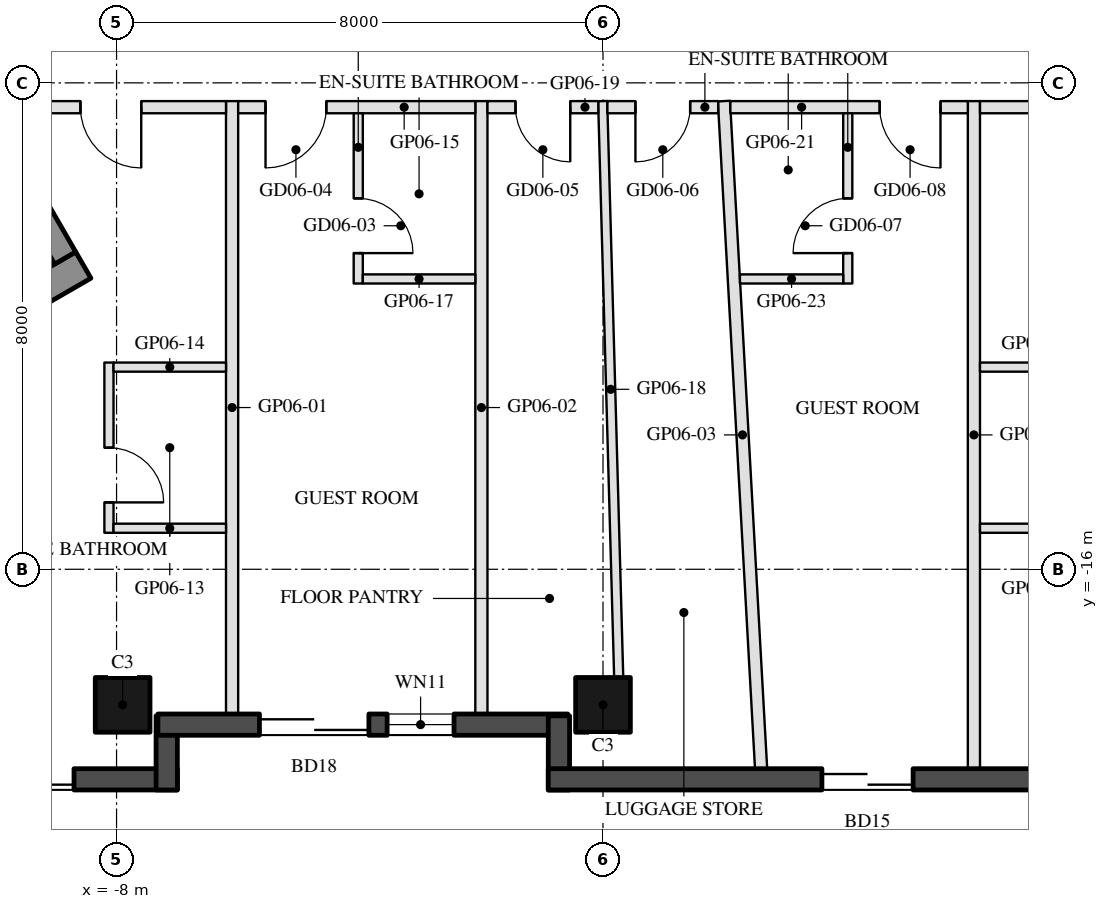
"""IFC4 building model, lengths in metres.
Left out: names, types, materials, properties, quantities, classifications, styles, units other than length and angle.
Written with IfcOpenShell. Run it as: python <this file> out.ifc"""

import sys

from ifc_helpers import new_model, si_unit, direction, frame, frame_2d, origin, origin_2d, place, context, subcontext, project, spatial, rectangle, hollow_rectangle, extrude, element, fill, save


model = new_model("IFC4")
c1 = context("Model", 3, precision=1e-05, world=origin(), true_north=direction((0.0, 1.0)))
c2 = subcontext(c1, "Body", "Model", "MODEL_VIEW")
j1 = project(units=[si_unit("LENGTHUNIT", "METRE"), si_unit("PLANEANGLEUNIT", "RADIAN")], contexts=[c1])
p1 = place(None, origin())
s1 = spatial("IfcSite", under=j1, at=p1, CompositionType="ELEMENT")
p2 = place(p1, origin())
s2 = spatial("IfcBuilding", under=s1, at=p2, CompositionType="ELEMENT")
p3 = place(p2, frame((0.0, 0.0, 87.2)))
s3 = spatial("IfcBuildingStorey", under=s2, at=p3, CompositionType="ELEMENT", Elevation=87.2)
for number, where, z_axis, x_axis in (
    (1, (-7.9, -18.23, 0.0), (0.0, 0.0, 1.0), (-1.0, 0.0, 0.0)),
    (2, (0.0, -18.23, 0.0), (0.0, 0.0, 1.0), (-1.0, 0.0, 0.0)),
):
    element("IfcColumn", number, at=place(p3, frame(where, z_axis=z_axis, x_axis=x_axis)), inside=s3, PredefinedType="COLUMN", context=c2, shape_type="SweptSolid", body=[
        extrude(hollow_rectangle(XDim=0.9, YDim=0.9, WallThickness=0.04, at=origin_2d()), origin(), (0.0, 0.0, 1.0), 3.7),
    ])
p4 = place(p3, frame((-18.816, -19.455, 0.0), z_axis=(0.0, 0.0, 1.0), x_axis=(1.0, 0.0, 0.0)))
e3 = element("IfcWall", 3, at=p4, inside=s3, PredefinedType="SOLIDWALL", context=c2, shape_type="SweptSolid", body=[
    extrude(rectangle(XDim=11.816, YDim=0.35, at=frame_2d((5.908, 0.0))), origin(), (0.0, 0.0, 1.0), 3.55),
])
p5 = place(p4, frame((0.381, 0.0, 0.3)))
e4 = element("IfcOpeningElement", 4, at=p5, cuts=e3, PredefinedType="OPENING", context=c2, shape_type="SweptSolid", body=[
    extrude(rectangle(XDim=1.8, YDim=2.65, at=frame_2d((0.9, 1.325))), frame((0.0, 0.185, 0.0), z_axis=(0.0, -1.0, 0.0), x_axis=(1.0, 0.0, 0.0)), (0.0, 0.0, 1.0), 0.37),
])
p6 = place(p4, frame((7.716, 0.0, 0.0)))
e5 = element("IfcOpeningElement", 5, at=p6, cuts=e3, PredefinedType="OPENING", context=c2, shape_type="SweptSolid", body=[
    extrude(rectangle(XDim=2.4, YDim=2.4, at=frame_2d((1.2, 1.2))), frame((0.0, 0.185, 0.0), z_axis=(0.0, -1.0, 0.0), x_axis=(1.0, 0.0, 0.0)), (0.0, 0.0, 1.0), 0.37),
])
p7 = place(p4, frame((3.816, 0.0, 0.3)))
e6 = element("IfcOpeningElement", 6, at=p7, cuts=e3, PredefinedType="OPENING", context=c2, shape_type="SweptSolid", body=[
    extrude(rectangle(XDim=1.6, YDim=2.65, at=frame_2d((0.8, 1.325))), frame((0.0, 0.185, 0.0), z_axis=(0.0, -1.0, 0.0), x_axis=(1.0, 0.0, 0.0)), (0.0, 0.0, 1.0), 0.37),
])
p8 = place(p4, frame((5.716, 0.0, 0.3)))
e7 = element("IfcOpeningElement", 7, at=p8, cuts=e3, PredefinedType="OPENING", context=c2, shape_type="SweptSolid", body=[
    extrude(rectangle(XDim=1.6, YDim=2.65, at=frame_2d((0.8, 1.325))), frame((0.0, 0.185, 0.0), z_axis=(0.0, -1.0, 0.0), x_axis=(1.0, 0.0, 0.0)), (0.0, 0.0, 1.0), 0.37),
])
p9 = place(p3, frame((-7.175, -19.63, 0.0), z_axis=(0.0, 0.0, 1.0), x_axis=(0.0, 1.0, 0.0)))
e8 = element("IfcWall", 8, at=p9, inside=s3, PredefinedType="SOLIDWALL", context=c2, shape_type="SweptSolid", body=[
    extrude(rectangle(XDim=1.22, YDim=0.35, at=frame_2d((0.61, 0.0))), origin(), (0.0, 0.0, 1.0), 3.55),
])
p10 = place(p3, frame((-7.32, -18.555, 0.0), z_axis=(0.0, 0.0, 1.0), x_axis=(1.0, 0.0, 0.0)))
e9 = element("IfcWall", 9, at=p10, inside=s3, PredefinedType="SOLIDWALL", context=c2, shape_type="SweptSolid", body=[
    extrude(rectangle(XDim=6.74, YDim=0.35, at=frame_2d((3.37, 0.0))), origin(), (0.0, 0.0, 1.0), 3.55),
])
p11 = place(p10, frame((1.67, 0.0, 0.0)))
e10 = element("IfcOpeningElement", 10, at=p11, cuts=e9, PredefinedType="OPENING", context=c2, shape_type="SweptSolid", body=[
    extrude(rectangle(XDim=1.8, YDim=2.4, at=frame_2d((0.9, 1.2))), frame((0.0, 0.185, 0.0), z_axis=(0.0, -1.0, 0.0), x_axis=(1.0, 0.0, 0.0)), (0.0, 0.0, 1.0), 0.37),
])
p12 = place(p10, frame((3.77, 0.0, 0.3)))
e11 = element("IfcOpeningElement", 11, at=p12, cuts=e9, PredefinedType="OPENING", context=c2, shape_type="SweptSolid", body=[
    extrude(rectangle(XDim=1.1, YDim=2.65, at=frame_2d((0.55, 1.325))), frame((0.0, 0.185, 0.0), z_axis=(0.0, -1.0, 0.0), x_axis=(1.0, 0.0, 0.0)), (0.0, 0.0, 1.0), 0.37),
])
p13 = place(p3, frame((-0.725, -18.41, 0.0), z_axis=(0.0, 0.0, 1.0), x_axis=(0.0, -1.0, 0.0)))
e12 = element("IfcWall", 12, at=p13, inside=s3, PredefinedType="SOLIDWALL", context=c2, shape_type="SweptSolid", body=[
    extrude(rectangle(XDim=1.22, YDim=0.35, at=frame_2d((0.61, 0.0))), origin(), (0.0, 0.0, 1.0), 3.55),
])
p14 = place(p3, frame((-0.9, -19.455, 0.0), z_axis=(0.0, 0.0, 1.0), x_axis=(1.0, 0.0, 0.0)))
e13 = element("IfcWall", 13, at=p14, inside=s3, PredefinedType="SOLIDWALL", context=c2, shape_type="SweptSolid", body=[
    extrude(rectangle(XDim=9.7, YDim=0.35, at=frame_2d((4.85, 0.0))), origin(), (0.0, 0.0, 1.0), 3.55),
])
p15 = place(p14, frame((4.5, 0.0, 0.0)))
e14 = element("IfcOpeningElement", 14, at=p15, cuts=e13, PredefinedType="OPENING", context=c2, shape_type="SweptSolid", body=[
    extrude(rectangle(XDim=1.5, YDim=2.4, at=frame_2d((0.75, 1.2))), frame((0.0, 0.185, 0.0), z_axis=(0.0, -1.0, 0.0), x_axis=(1.0, 0.0, 0.0)), (0.0, 0.0, 1.0), 0.37),
])
p16 = place(p3, frame((-8.547, -10.997, 0.0), z_axis=(0.0, 0.0, 1.0), x_axis=(-0.866025009528, -0.500000682871, 0.0)))
e15 = element("IfcWall", 15, at=p16, inside=s3, PredefinedType="SHEAR", context=c2, shape_type="SweptSolid", body=[
    extrude(rectangle(XDim=14.837, YDim=0.5, at=frame_2d((7.418, 0.0))), origin(), (0.0, 0.0, 1.0), 3.5),
])
p17 = place(p3, frame((-13.845, -2.22, 0.0), z_axis=(0.0, 0.0, 1.0), x_axis=(0.500004234368, -0.866022959057, 0.0)))
e16 = element("IfcWall", 16, at=p17, inside=s3, PredefinedType="SHEAR", context=c2, shape_type="SweptSolid", body=[
    extrude(rectangle(XDim=10.0, YDim=0.4, at=frame_2d((5.0, 0.0))), origin(), (0.0, 0.0, 1.0), 3.5),
])
p18 = place(p17, frame((3.55, 0.0, 0.0)))
e17 = element("IfcOpeningElement", 17, at=p18, cuts=e16, PredefinedType="OPENING", context=c2, shape_type="SweptSolid", body=[
    extrude(rectangle(XDim=1.1, YDim=2.1, at=frame_2d((0.55, 1.05))), frame((0.0, 0.21, 0.0), z_axis=(0.0, -1.0, 0.0), x_axis=(1.0, 0.0, 0.0)), (0.0, 0.0, 1.0), 0.42),
])
p19 = place(p17, frame((5.85, 0.0, 0.0)))
e18 = element("IfcOpeningElement", 18, at=p19, cuts=e16, PredefinedType="OPENING", context=c2, shape_type="SweptSolid", body=[
    extrude(rectangle(XDim=1.4, YDim=2.1, at=frame_2d((0.7, 1.05))), frame((0.0, 0.21, 0.0), z_axis=(0.0, -1.0, 0.0), x_axis=(1.0, 0.0, 0.0)), (0.0, 0.0, 1.0), 0.42),
])
for number, where, z_axis, x_axis in (
    (19, (-6.1, -18.38, 0.0), (0.0, 0.0, 1.0), (0.0, 1.0, 0.0)),
    (20, (-2.0, -18.38, 0.0), (0.0, 0.0, 1.0), (0.0, 1.0, 0.0)),
):
    element("IfcWall", number, at=place(p3, frame(where, z_axis=z_axis, x_axis=x_axis)), inside=s3, PredefinedType="PARTITIONING", context=c2, shape_type="SweptSolid", body=[
        extrude(rectangle(XDim=10.08, YDim=0.2, at=frame_2d((5.04, 0.0))), origin(), (0.0, 0.0, 1.0), 2.96),
    ])
p20 = place(p3, frame((2.6, -19.28, 0.0), z_axis=(0.0, 0.0, 1.0), x_axis=(-0.055568385591, 0.998454883569, 0.0)))
e21 = element("IfcWall", 21, at=p20, inside=s3, PredefinedType="PARTITIONING", context=c2, shape_type="SweptSolid", body=[
    extrude(rectangle(XDim=10.997, YDim=0.2, at=frame_2d((5.499, 0.0))), origin(), (0.0, 0.0, 1.0), 2.96),
])
p21 = place(p3, frame((6.1, -19.28, 0.0), z_axis=(0.0, 0.0, 1.0), x_axis=(0.0, 1.0, 0.0)))
e22 = element("IfcWall", 22, at=p21, inside=s3, PredefinedType="PARTITIONING", context=c2, shape_type="SweptSolid", body=[
    extrude(rectangle(XDim=10.98, YDim=0.2, at=frame_2d((5.49, 0.0))), origin(), (0.0, 0.0, 1.0), 2.96),
])
p22 = place(p3, frame((-6.2, -8.4, 0.0), z_axis=(0.0, 0.0, 1.0), x_axis=(-1.0, 0.0, 0.0)))
e23 = element("IfcWall", 23, at=p22, inside=s3, PredefinedType="PARTITIONING", context=c2, shape_type="SweptSolid", body=[
    extrude(rectangle(XDim=3.788, YDim=0.2, at=frame_2d((1.894, 0.0))), origin(), (0.0, 0.0, 1.0), 2.95),
])
p23 = place(p22, frame((1.394, 0.0, 0.0)))
e24 = element("IfcOpeningElement", 24, at=p23, cuts=e23, PredefinedType="OPENING", context=c2, shape_type="SweptSolid", body=[
    extrude(rectangle(XDim=1.0, YDim=2.1, at=frame_2d((0.5, 1.05))), frame((0.0, 0.11, 0.0), z_axis=(0.0, -1.0, 0.0), x_axis=(1.0, 0.0, 0.0)), (0.0, 0.0, 1.0), 0.22),
])
p24 = place(p3, frame((-8.125, -12.6, 0.0), z_axis=(0.0, 0.0, 1.0), x_axis=(0.0, -1.0, 0.0)))
e25 = element("IfcWall", 25, at=p24, inside=s3, PredefinedType="PARTITIONING", context=c2, shape_type="SweptSolid", body=[
    extrude(rectangle(XDim=2.8, YDim=0.15, at=frame_2d((1.4, 0.0))), origin(), (0.0, 0.0, 1.0), 3.55),
])
p25 = place(p24, frame((1.4, 0.0, 0.0)))
e26 = element("IfcOpeningElement", 26, at=p25, cuts=e25, PredefinedType="OPENING", context=c2, shape_type="SweptSolid", body=[
    extrude(rectangle(XDim=0.9, YDim=2.1, at=frame_2d((0.45, 1.05))), frame((0.0, 0.085, 0.0), z_axis=(0.0, -1.0, 0.0), x_axis=(1.0, 0.0, 0.0)), (0.0, 0.0, 1.0), 0.17),
])
for number, where, z_axis, x_axis in (
    (27, (-8.05, -15.325, 0.0), (0.0, 0.0, 1.0), (1.0, 0.0, 0.0)),
    (28, (-8.05, -12.675, 0.0), (0.0, 0.0, 1.0), (1.0, 0.0, 0.0)),
):
    element("IfcWall", number, at=place(p3, frame(where, z_axis=z_axis, x_axis=x_axis)), inside=s3, PredefinedType="PARTITIONING", context=c2, shape_type="SweptSolid", body=[
        extrude(rectangle(XDim=1.85, YDim=0.15, at=frame_2d((0.925, 0.0))), origin(), (0.0, 0.0, 1.0), 2.95),
    ])
p26 = place(p3, frame((-2.1, -8.4, 0.0), z_axis=(0.0, 0.0, 1.0), x_axis=(-1.0, 0.0, 0.0)))
e29 = element("IfcWall", 29, at=p26, inside=s3, PredefinedType="PARTITIONING", context=c2, shape_type="SweptSolid", body=[
    extrude(rectangle(XDim=3.9, YDim=0.2, at=frame_2d((1.95, 0.0))), origin(), (0.0, 0.0, 1.0), 2.95),
])
p27 = place(p26, frame((2.45, 0.0, 0.0)))
e30 = element("IfcOpeningElement", 30, at=p27, cuts=e29, PredefinedType="OPENING", context=c2, shape_type="SweptSolid", body=[
    extrude(rectangle(XDim=1.0, YDim=2.1, at=frame_2d((0.5, 1.05))), frame((0.0, 0.11, 0.0), z_axis=(0.0, -1.0, 0.0), x_axis=(1.0, 0.0, 0.0)), (0.0, 0.0, 1.0), 0.22),
])
p28 = place(p3, frame((-4.025, -8.5, 0.0), z_axis=(0.0, 0.0, 1.0), x_axis=(0.0, -1.0, 0.0)))
e31 = element("IfcWall", 31, at=p28, inside=s3, PredefinedType="PARTITIONING", context=c2, shape_type="SweptSolid", body=[
    extrude(rectangle(XDim=2.8, YDim=0.15, at=frame_2d((1.4, 0.0))), origin(), (0.0, 0.0, 1.0), 2.95),
])
p29 = place(p28, frame((1.4, 0.0, 0.0)))
e32 = element("IfcOpeningElement", 32, at=p29, cuts=e31, PredefinedType="OPENING", context=c2, shape_type="SweptSolid", body=[
    extrude(rectangle(XDim=0.9, YDim=2.1, at=frame_2d((0.45, 1.05))), frame((0.0, 0.085, 0.0), z_axis=(0.0, -1.0, 0.0), x_axis=(1.0, 0.0, 0.0)), (0.0, 0.0, 1.0), 0.17),
])
p30 = place(p3, frame((-3.95, -11.225, 0.0), z_axis=(0.0, 0.0, 1.0), x_axis=(1.0, 0.0, 0.0)))
e33 = element("IfcWall", 33, at=p30, inside=s3, PredefinedType="PARTITIONING", context=c2, shape_type="SweptSolid", body=[
    extrude(rectangle(XDim=1.85, YDim=0.15, at=frame_2d((0.925, 0.0))), origin(), (0.0, 0.0, 1.0), 2.95),
])
p31 = place(p3, frame((0.258, -17.78, 0.0), z_axis=(0.0, 0.0, 1.0), x_axis=(-0.027828517679, 0.999612711806, 0.0)))
e34 = element("IfcWall", 34, at=p31, inside=s3, PredefinedType="PARTITIONING", context=c2, shape_type="SweptSolid", body=[
    extrude(rectangle(XDim=9.484, YDim=0.15, at=frame_2d((4.742, 0.0))), origin(), (0.0, 0.0, 1.0), 2.95),
])
p32 = place(p3, frame((-0.078, -8.4, 0.0), z_axis=(0.0, 0.0, 1.0), x_axis=(-1.0, 0.0, 0.0)))
e35 = element("IfcWall", 35, at=p32, inside=s3, PredefinedType="PARTITIONING", context=c2, shape_type="SweptSolid", body=[
    extrude(rectangle(XDim=1.822, YDim=0.2, at=frame_2d((0.911, 0.0))), origin(), (0.0, 0.0, 1.0), 2.95),
])
p33 = place(p32, frame((0.461, 0.0, 0.0)))
e36 = element("IfcOpeningElement", 36, at=p33, cuts=e35, PredefinedType="OPENING", context=c2, shape_type="SweptSolid", body=[
    extrude(rectangle(XDim=0.9, YDim=2.1, at=frame_2d((0.45, 1.05))), frame((0.0, 0.11, 0.0), z_axis=(0.0, -1.0, 0.0), x_axis=(1.0, 0.0, 0.0)), (0.0, 0.0, 1.0), 0.22),
])
p34 = place(p3, frame((1.894, -8.4, 0.0), z_axis=(0.0, 0.0, 1.0), x_axis=(-1.0, 0.0, 0.0)))
e37 = element("IfcWall", 37, at=p34, inside=s3, PredefinedType="PARTITIONING", context=c2, shape_type="SweptSolid", body=[
    extrude(rectangle(XDim=1.822, YDim=0.2, at=frame_2d((0.911, 0.0))), origin(), (0.0, 0.0, 1.0), 2.95),
])
p35 = place(p34, frame((0.461, 0.0, 0.0)))
e38 = element("IfcOpeningElement", 38, at=p35, cuts=e37, PredefinedType="OPENING", context=c2, shape_type="SweptSolid", body=[
    extrude(rectangle(XDim=0.9, YDim=2.1, at=frame_2d((0.45, 1.05))), frame((0.0, 0.11, 0.0), z_axis=(0.0, -1.0, 0.0), x_axis=(1.0, 0.0, 0.0)), (0.0, 0.0, 1.0), 0.22),
])
p36 = place(p3, frame((6.0, -8.4, 0.0), z_axis=(0.0, 0.0, 1.0), x_axis=(-1.0, 0.0, 0.0)))
e39 = element("IfcWall", 39, at=p36, inside=s3, PredefinedType="PARTITIONING", context=c2, shape_type="SweptSolid", body=[
    extrude(rectangle(XDim=3.906, YDim=0.2, at=frame_2d((1.953, 0.0))), origin(), (0.0, 0.0, 1.0), 2.95),
])
p37 = place(p36, frame((0.45, 0.0, 0.0)))
e40 = element("IfcOpeningElement", 40, at=p37, cuts=e39, PredefinedType="OPENING", context=c2, shape_type="SweptSolid", body=[
    extrude(rectangle(XDim=1.0, YDim=2.1, at=frame_2d((0.5, 1.05))), frame((0.0, 0.11, 0.0), z_axis=(0.0, -1.0, 0.0), x_axis=(1.0, 0.0, 0.0)), (0.0, 0.0, 1.0), 0.22),
])
p38 = place(p3, frame((4.025, -11.3, 0.0), z_axis=(0.0, 0.0, 1.0), x_axis=(0.0, 1.0, 0.0)))
e41 = element("IfcWall", 41, at=p38, inside=s3, PredefinedType="PARTITIONING", context=c2, shape_type="SweptSolid", body=[
    extrude(rectangle(XDim=2.8, YDim=0.15, at=frame_2d((1.4, 0.0))), origin(), (0.0, 0.0, 1.0), 2.95),
])
p39 = place(p38, frame((0.5, 0.0, 0.0)))
e42 = element("IfcOpeningElement", 42, at=p39, cuts=e41, PredefinedType="OPENING", context=c2, shape_type="SweptSolid", body=[
    extrude(rectangle(XDim=0.9, YDim=2.1, at=frame_2d((0.45, 1.05))), frame((0.0, 0.085, 0.0), z_axis=(0.0, -1.0, 0.0), x_axis=(1.0, 0.0, 0.0)), (0.0, 0.0, 1.0), 0.17),
])
p40 = place(p3, frame((2.252, -11.225, 0.0), z_axis=(0.0, 0.0, 1.0), x_axis=(1.0, 0.0, 0.0)))
e43 = element("IfcWall", 43, at=p40, inside=s3, PredefinedType="PARTITIONING", context=c2, shape_type="SweptSolid", body=[
    extrude(rectangle(XDim=1.698, YDim=0.15, at=frame_2d((0.849, 0.0))), origin(), (0.0, 0.0, 1.0), 2.95),
])
p41 = place(p3, frame((9.988, -8.4, 0.0), z_axis=(0.0, 0.0, 1.0), x_axis=(-1.0, 0.0, 0.0)))
e44 = element("IfcWall", 44, at=p41, inside=s3, PredefinedType="PARTITIONING", context=c2, shape_type="SweptSolid", body=[
    extrude(rectangle(XDim=3.788, YDim=0.2, at=frame_2d((1.894, 0.0))), origin(), (0.0, 0.0, 1.0), 2.95),
])
p42 = place(p41, frame((1.394, 0.0, 0.0)))
e45 = element("IfcOpeningElement", 45, at=p42, cuts=e44, PredefinedType="OPENING", context=c2, shape_type="SweptSolid", body=[
    extrude(rectangle(XDim=1.0, YDim=2.1, at=frame_2d((0.5, 1.05))), frame((0.0, 0.11, 0.0), z_axis=(0.0, -1.0, 0.0), x_axis=(1.0, 0.0, 0.0)), (0.0, 0.0, 1.0), 0.22),
])
for number, where, z_axis, x_axis in (
    (46, (6.2, -15.325, 0.0), (0.0, 0.0, 1.0), (1.0, 0.0, 0.0)),
    (47, (6.2, -12.675, 0.0), (0.0, 0.0, 1.0), (1.0, 0.0, 0.0)),
):
    element("IfcWall", number, at=place(p3, frame(where, z_axis=z_axis, x_axis=x_axis)), inside=s3, PredefinedType="PARTITIONING", context=c2, shape_type="SweptSolid", body=[
        extrude(rectangle(XDim=1.85, YDim=0.15, at=frame_2d((0.925, 0.0))), origin(), (0.0, 0.0, 1.0), 2.95),
    ])
p43 = place(p6, frame((2.4, 0.0, 0.0), z_axis=(0.0, 0.0, 1.0), x_axis=(-1.0, 0.0, 0.0)))
e48 = element("IfcDoor", 48, at=p43, inside=s3, OperationType="SLIDING_TO_LEFT", PredefinedType="DOOR", context=c2, shape_type="SweptSolid", body=[
    extrude(rectangle(XDim=2.4, YDim=2.4, at=frame_2d((1.2, 1.2))), frame((0.0, 0.025, 0.0), z_axis=(0.0, -1.0, 0.0), x_axis=(1.0, 0.0, 0.0)), (0.0, 0.0, 1.0), 0.05),
])
fill(e5, e48)
p44 = place(p11, frame((1.8, 0.0, 0.0), z_axis=(0.0, 0.0, 1.0), x_axis=(-1.0, 0.0, 0.0)))
e49 = element("IfcDoor", 49, at=p44, inside=s3, OperationType="SLIDING_TO_LEFT", PredefinedType="DOOR", context=c2, shape_type="SweptSolid", body=[
    extrude(rectangle(XDim=1.8, YDim=2.4, at=frame_2d((0.9, 1.2))), frame((0.0, 0.025, 0.0), z_axis=(0.0, -1.0, 0.0), x_axis=(1.0, 0.0, 0.0)), (0.0, 0.0, 1.0), 0.05),
])
fill(e10, e49)
p45 = place(p12, origin())
e50 = element("IfcWindow", 50, at=p45, inside=s3, PartitioningType="SINGLE_PANEL", PredefinedType="WINDOW", context=c2, shape_type="SweptSolid", body=[
    extrude(rectangle(XDim=1.1, YDim=2.65, at=frame_2d((0.55, 1.325))), frame((0.0, 0.03, 0.0), z_axis=(0.0, -1.0, 0.0), x_axis=(1.0, 0.0, 0.0)), (0.0, 0.0, 1.0), 0.06),
])
fill(e11, e50)
p46 = place(p15, frame((1.5, 0.0, 0.0), z_axis=(0.0, 0.0, 1.0), x_axis=(-1.0, 0.0, 0.0)))
e51 = element("IfcDoor", 51, at=p46, inside=s3, OperationType="SLIDING_TO_LEFT", PredefinedType="DOOR", context=c2, shape_type="SweptSolid", body=[
    extrude(rectangle(XDim=1.5, YDim=2.4, at=frame_2d((0.75, 1.2))), frame((0.0, 0.025, 0.0), z_axis=(0.0, -1.0, 0.0), x_axis=(1.0, 0.0, 0.0)), (0.0, 0.0, 1.0), 0.05),
])
fill(e14, e51)
p47 = place(p25, origin())
e52 = element("IfcDoor", 52, at=p47, inside=s3, OperationType="SINGLE_SWING_RIGHT", PredefinedType="DOOR", context=c2, shape_type="SweptSolid", body=[
    extrude(rectangle(XDim=0.9, YDim=2.1, at=frame_2d((0.45, 1.05))), frame((0.0, 0.025, 0.0), z_axis=(0.0, -1.0, 0.0), x_axis=(1.0, 0.0, 0.0)), (0.0, 0.0, 1.0), 0.05),
])
fill(e26, e52)
p48 = place(p23, origin())
e53 = element("IfcDoor", 53, at=p48, inside=s3, OperationType="SINGLE_SWING_LEFT", PredefinedType="DOOR", context=c2, shape_type="SweptSolid", body=[
    extrude(rectangle(XDim=1.0, YDim=2.1, at=frame_2d((0.5, 1.05))), frame((0.0, 0.025, 0.0), z_axis=(0.0, -1.0, 0.0), x_axis=(1.0, 0.0, 0.0)), (0.0, 0.0, 1.0), 0.05),
])
fill(e24, e53)
p49 = place(p29, origin())
e54 = element("IfcDoor", 54, at=p49, inside=s3, OperationType="SINGLE_SWING_RIGHT", PredefinedType="DOOR", context=c2, shape_type="SweptSolid", body=[
    extrude(rectangle(XDim=0.9, YDim=2.1, at=frame_2d((0.45, 1.05))), frame((0.0, 0.025, 0.0), z_axis=(0.0, -1.0, 0.0), x_axis=(1.0, 0.0, 0.0)), (0.0, 0.0, 1.0), 0.05),
])
fill(e32, e54)
p50 = place(p27, origin())
e55 = element("IfcDoor", 55, at=p50, inside=s3, OperationType="SINGLE_SWING_RIGHT", PredefinedType="DOOR", context=c2, shape_type="SweptSolid", body=[
    extrude(rectangle(XDim=1.0, YDim=2.1, at=frame_2d((0.5, 1.05))), frame((0.0, 0.025, 0.0), z_axis=(0.0, -1.0, 0.0), x_axis=(1.0, 0.0, 0.0)), (0.0, 0.0, 1.0), 0.05),
])
fill(e30, e55)
p51 = place(p33, origin())
e56 = element("IfcDoor", 56, at=p51, inside=s3, OperationType="SINGLE_SWING_LEFT", PredefinedType="DOOR", context=c2, shape_type="SweptSolid", body=[
    extrude(rectangle(XDim=0.9, YDim=2.1, at=frame_2d((0.45, 1.05))), frame((0.0, 0.025, 0.0), z_axis=(0.0, -1.0, 0.0), x_axis=(1.0, 0.0, 0.0)), (0.0, 0.0, 1.0), 0.05),
])
fill(e36, e56)
p52 = place(p35, origin())
e57 = element("IfcDoor", 57, at=p52, inside=s3, OperationType="SINGLE_SWING_RIGHT", PredefinedType="DOOR", context=c2, shape_type="SweptSolid", body=[
    extrude(rectangle(XDim=0.9, YDim=2.1, at=frame_2d((0.45, 1.05))), frame((0.0, 0.025, 0.0), z_axis=(0.0, -1.0, 0.0), x_axis=(1.0, 0.0, 0.0)), (0.0, 0.0, 1.0), 0.05),
])
fill(e38, e57)
p53 = place(p39, origin())
e58 = element("IfcDoor", 58, at=p53, inside=s3, OperationType="SINGLE_SWING_LEFT", PredefinedType="DOOR", context=c2, shape_type="SweptSolid", body=[
    extrude(rectangle(XDim=0.9, YDim=2.1, at=frame_2d((0.45, 1.05))), frame((0.0, 0.025, 0.0), z_axis=(0.0, -1.0, 0.0), x_axis=(1.0, 0.0, 0.0)), (0.0, 0.0, 1.0), 0.05),
])
fill(e42, e58)
p54 = place(p37, origin())
e59 = element("IfcDoor", 59, at=p54, inside=s3, OperationType="SINGLE_SWING_LEFT", PredefinedType="DOOR", context=c2, shape_type="SweptSolid", body=[
    extrude(rectangle(XDim=1.0, YDim=2.1, at=frame_2d((0.5, 1.05))), frame((0.0, 0.025, 0.0), z_axis=(0.0, -1.0, 0.0), x_axis=(1.0, 0.0, 0.0)), (0.0, 0.0, 1.0), 0.05),
])
fill(e40, e59)
save(model, sys.argv[1])
